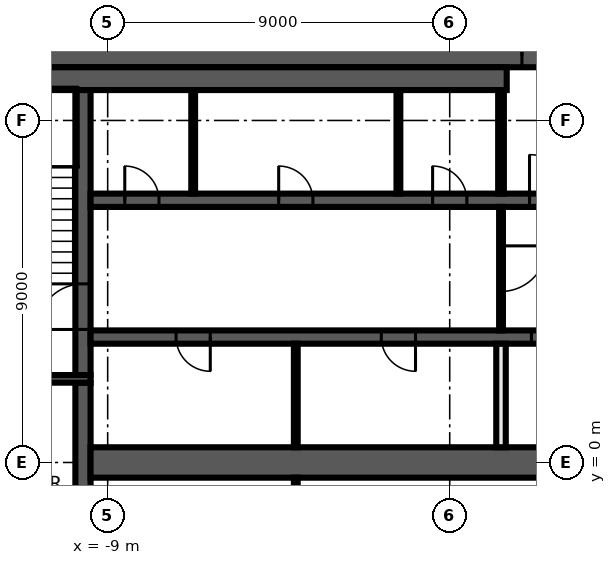
"""IFC4 building model, lengths in metres.
Left out: names, types, materials, properties, quantities, classifications, styles, units other than length and angle.
Written with IfcOpenShell. Run it as: python <this file> out.ifc"""

import sys

from ifc_helpers import new_model, si_unit, direction, frame, frame_2d, origin, place, context, subcontext, project, spatial, rectangle, extrude, element, fill, save


model = new_model("IFC4")
c1 = context("Model", 3, precision=1e-05, world=origin(), true_north=direction((0.0, 1.0)))
c2 = subcontext(c1, "Body", "Model", "MODEL_VIEW")
j1 = project(units=[si_unit("LENGTHUNIT", "METRE"), si_unit("PLANEANGLEUNIT", "RADIAN")], contexts=[c1])
p1 = place(None, origin())
s1 = spatial("IfcSite", under=j1, at=p1, CompositionType="ELEMENT")
p2 = place(p1, origin())
s2 = spatial("IfcBuilding", under=s1, at=p2, CompositionType="ELEMENT")
p3 = place(p2, frame((0.0, 0.0, 348.8)))
s3 = spatial("IfcBuildingStorey", under=s2, at=p3, CompositionType="ELEMENT", Elevation=348.8)
p4 = place(p3, frame((-14.0, 10.7, 0.0), z_axis=(0.0, 0.0, 1.0), x_axis=(1.0, 0.0, 0.0)))
e1 = element("IfcWall", 1, at=p4, inside=s3, PredefinedType="SHEAR", context=c2, shape_type="SweptSolid", body=[
    extrude(rectangle(XDim=28.0, YDim=0.6, at=frame_2d((14.0, 0.0))), origin(), (0.0, 0.0, 1.0), 3.7),
])
p5 = place(p4, frame((15.9, 0.0, 0.0)))
e2 = element("IfcOpeningElement", 2, at=p5, cuts=e1, PredefinedType="OPENING", context=c2, shape_type="SweptSolid", body=[
    extrude(rectangle(XDim=1.6, YDim=2.1, at=frame_2d((0.8, 1.05))), frame((0.0, 0.31, 0.0), z_axis=(0.0, -1.0, 0.0), x_axis=(1.0, 0.0, 0.0)), (0.0, 0.0, 1.0), 0.62),
])
p6 = place(p3, frame((-13.4, 10.1, 0.0), z_axis=(0.0, 0.0, 1.0), x_axis=(1.0, 0.0, 0.0)))
e3 = element("IfcWall", 3, at=p6, inside=s3, PredefinedType="SHEAR", context=c2, shape_type="SweptSolid", body=[
    extrude(rectangle(XDim=14.9, YDim=0.6, at=frame_2d((7.45, 0.0))), origin(), (0.0, 0.0, 1.0), 3.7),
])
p7 = place(p3, frame((-9.65, -2.1, 0.0), z_axis=(0.0, 0.0, 1.0), x_axis=(0.0, 1.0, 0.0)))
e4 = element("IfcWall", 4, at=p7, inside=s3, PredefinedType="SHEAR", context=c2, shape_type="SweptSolid", body=[
    extrude(rectangle(XDim=4.2, YDim=0.4, at=frame_2d((2.1, 0.0))), origin(), (0.0, 0.0, 1.0), 3.7),
])
p8 = place(p3, frame((-9.65, 2.3, 0.0), z_axis=(0.0, 0.0, 1.0), x_axis=(0.0, 1.0, 0.0)))
e5 = element("IfcWall", 5, at=p8, inside=s3, PredefinedType="SHEAR", context=c2, shape_type="SweptSolid", body=[
    extrude(rectangle(XDim=7.5, YDim=0.4, at=frame_2d((3.75, 0.0))), origin(), (0.0, 0.0, 1.0), 3.7),
])
p9 = place(p8, frame((1.2, 0.0, 0.0)))
e6 = element("IfcOpeningElement", 6, at=p9, cuts=e5, PredefinedType="OPENING", context=c2, shape_type="SweptSolid", body=[
    extrude(rectangle(XDim=1.2, YDim=2.1, at=frame_2d((0.6, 1.05))), frame((0.0, 0.21, 0.0), z_axis=(0.0, -1.0, 0.0), x_axis=(1.0, 0.0, 0.0)), (0.0, 0.0, 1.0), 0.42),
])
p10 = place(p3, frame((-9.45, 2.2, 0.0), z_axis=(0.0, 0.0, 1.0), x_axis=(-1.0, 0.0, 0.0)))
e7 = element("IfcWall", 7, at=p10, inside=s3, PredefinedType="SHEAR", context=c2, shape_type="SweptSolid", body=[
    extrude(rectangle(XDim=3.35, YDim=0.2, at=frame_2d((1.675, 0.0))), origin(), (0.0, 0.0, 1.0), 3.7),
])
p11 = place(p3, frame((-9.45, 6.9, 0.0), z_axis=(0.0, 0.0, 1.0), x_axis=(1.0, 0.0, 0.0)))
e8 = element("IfcWall", 8, at=p11, inside=s3, PredefinedType="SHEAR", context=c2, shape_type="SweptSolid", body=[
    extrude(rectangle(XDim=18.9, YDim=0.35, at=frame_2d((9.45, 0.0))), origin(), (0.0, 0.0, 1.0), 3.7),
])
p12 = place(p11, frame((11.55, 0.0, 0.0)))
e9 = element("IfcOpeningElement", 9, at=p12, cuts=e8, PredefinedType="OPENING", context=c2, shape_type="SweptSolid", body=[
    extrude(rectangle(XDim=1.2, YDim=2.1, at=frame_2d((0.6, 1.05))), frame((0.0, 0.185, 0.0), z_axis=(0.0, -1.0, 0.0), x_axis=(1.0, 0.0, 0.0)), (0.0, 0.0, 1.0), 0.37),
])
p13 = place(p11, frame((14.3, 0.0, 0.0)))
e10 = element("IfcOpeningElement", 10, at=p13, cuts=e8, PredefinedType="OPENING", context=c2, shape_type="SweptSolid", body=[
    extrude(rectangle(XDim=1.1, YDim=2.1, at=frame_2d((0.55, 1.05))), frame((0.0, 0.185, 0.0), z_axis=(0.0, -1.0, 0.0), x_axis=(1.0, 0.0, 0.0)), (0.0, 0.0, 1.0), 0.37),
])
p14 = place(p11, frame((17.0, 0.0, 0.0)))
e11 = element("IfcOpeningElement", 11, at=p14, cuts=e8, PredefinedType="OPENING", context=c2, shape_type="SweptSolid", body=[
    extrude(rectangle(XDim=1.1, YDim=2.1, at=frame_2d((0.55, 1.05))), frame((0.0, 0.185, 0.0), z_axis=(0.0, -1.0, 0.0), x_axis=(1.0, 0.0, 0.0)), (0.0, 0.0, 1.0), 0.37),
])
p15 = place(p11, frame((0.9, 0.0, 0.0)))
e12 = element("IfcOpeningElement", 12, at=p15, cuts=e8, PredefinedType="OPENING", context=c2, shape_type="SweptSolid", body=[
    extrude(rectangle(XDim=0.9, YDim=2.1, at=frame_2d((0.45, 1.05))), frame((0.0, 0.185, 0.0), z_axis=(0.0, -1.0, 0.0), x_axis=(1.0, 0.0, 0.0)), (0.0, 0.0, 1.0), 0.37),
])
p16 = place(p11, frame((4.95, 0.0, 0.0)))
e13 = element("IfcOpeningElement", 13, at=p16, cuts=e8, PredefinedType="OPENING", context=c2, shape_type="SweptSolid", body=[
    extrude(rectangle(XDim=0.9, YDim=2.1, at=frame_2d((0.45, 1.05))), frame((0.0, 0.185, 0.0), z_axis=(0.0, -1.0, 0.0), x_axis=(1.0, 0.0, 0.0)), (0.0, 0.0, 1.0), 0.37),
])
p17 = place(p11, frame((9.0, 0.0, 0.0)))
e14 = element("IfcOpeningElement", 14, at=p17, cuts=e8, PredefinedType="OPENING", context=c2, shape_type="SweptSolid", body=[
    extrude(rectangle(XDim=0.9, YDim=2.1, at=frame_2d((0.45, 1.05))), frame((0.0, 0.185, 0.0), z_axis=(0.0, -1.0, 0.0), x_axis=(1.0, 0.0, 0.0)), (0.0, 0.0, 1.0), 0.37),
])
p18 = place(p3, frame((9.45, 3.3, 0.0), z_axis=(0.0, 0.0, 1.0), x_axis=(-1.0, 0.0, 0.0)))
e15 = element("IfcWall", 15, at=p18, inside=s3, PredefinedType="SHEAR", context=c2, shape_type="SweptSolid", body=[
    extrude(rectangle(XDim=18.9, YDim=0.35, at=frame_2d((9.45, 0.0))), origin(), (0.0, 0.0, 1.0), 3.7),
])
p19 = place(p18, frame((6.2, 0.0, 0.0)))
e16 = element("IfcOpeningElement", 16, at=p19, cuts=e15, PredefinedType="OPENING", context=c2, shape_type="SweptSolid", body=[
    extrude(rectangle(XDim=1.1, YDim=2.1, at=frame_2d((0.55, 1.05))), frame((0.0, 0.185, 0.0), z_axis=(0.0, -1.0, 0.0), x_axis=(1.0, 0.0, 0.0)), (0.0, 0.0, 1.0), 0.37),
])
p20 = place(p18, frame((3.5, 0.0, 0.0)))
e17 = element("IfcOpeningElement", 17, at=p20, cuts=e15, PredefinedType="OPENING", context=c2, shape_type="SweptSolid", body=[
    extrude(rectangle(XDim=1.1, YDim=2.1, at=frame_2d((0.55, 1.05))), frame((0.0, 0.185, 0.0), z_axis=(0.0, -1.0, 0.0), x_axis=(1.0, 0.0, 0.0)), (0.0, 0.0, 1.0), 0.37),
])
p21 = place(p18, frame((0.9, 0.0, 0.0)))
e18 = element("IfcOpeningElement", 18, at=p21, cuts=e15, PredefinedType="OPENING", context=c2, shape_type="SweptSolid", body=[
    extrude(rectangle(XDim=0.9, YDim=2.1, at=frame_2d((0.45, 1.05))), frame((0.0, 0.185, 0.0), z_axis=(0.0, -1.0, 0.0), x_axis=(1.0, 0.0, 0.0)), (0.0, 0.0, 1.0), 0.37),
])
p22 = place(p18, frame((15.75, 0.0, 0.0)))
e19 = element("IfcOpeningElement", 19, at=p22, cuts=e15, PredefinedType="OPENING", context=c2, shape_type="SweptSolid", body=[
    extrude(rectangle(XDim=0.9, YDim=2.1, at=frame_2d((0.45, 1.05))), frame((0.0, 0.185, 0.0), z_axis=(0.0, -1.0, 0.0), x_axis=(1.0, 0.0, 0.0)), (0.0, 0.0, 1.0), 0.37),
])
p23 = place(p18, frame((10.35, 0.0, 0.0)))
e20 = element("IfcOpeningElement", 20, at=p23, cuts=e15, PredefinedType="OPENING", context=c2, shape_type="SweptSolid", body=[
    extrude(rectangle(XDim=0.9, YDim=2.1, at=frame_2d((0.45, 1.05))), frame((0.0, 0.185, 0.0), z_axis=(0.0, -1.0, 0.0), x_axis=(1.0, 0.0, 0.0)), (0.0, 0.0, 1.0), 0.37),
])
p24 = place(p3, frame((-9.45, 0.0, 0.0), z_axis=(0.0, 0.0, 1.0), x_axis=(1.0, 0.0, 0.0)))
e21 = element("IfcWall", 21, at=p24, inside=s3, PredefinedType="SHEAR", context=c2, shape_type="SweptSolid", body=[
    extrude(rectangle(XDim=18.9, YDim=0.8, at=frame_2d((9.45, 0.0))), origin(), (0.0, 0.0, 1.0), 3.7),
])
p25 = place(p3, frame((1.35, 7.075, 0.0), z_axis=(0.0, 0.0, 1.0), x_axis=(0.0, 1.0, 0.0)))
e22 = element("IfcWall", 22, at=p25, inside=s3, PredefinedType="PARTITIONING", context=c2, shape_type="SweptSolid", body=[
    extrude(rectangle(XDim=2.725, YDim=0.15, at=frame_2d((1.363, 0.0))), origin(), (0.0, 0.0, 1.0), 3.7),
])
p26 = place(p3, frame((1.35, 6.725, 0.0), z_axis=(0.0, 0.0, 1.0), x_axis=(0.0, -1.0, 0.0)))
e23 = element("IfcWall", 23, at=p26, inside=s3, PredefinedType="PARTITIONING", context=c2, shape_type="SweptSolid", body=[
    extrude(rectangle(XDim=3.25, YDim=0.1, at=frame_2d((1.625, 0.0))), origin(), (0.0, 0.0, 1.0), 3.7),
])
p27 = place(p26, frame((1.025, 0.0, 0.0)))
e24 = element("IfcOpeningElement", 24, at=p27, cuts=e23, PredefinedType="OPENING", context=c2, shape_type="SweptSolid", body=[
    extrude(rectangle(XDim=1.2, YDim=2.1, at=frame_2d((0.6, 1.05))), frame((0.0, 0.06, 0.0), z_axis=(0.0, -1.0, 0.0), x_axis=(1.0, 0.0, 0.0)), (0.0, 0.0, 1.0), 0.12),
])
p28 = place(p3, frame((1.35, 0.4, 0.0), z_axis=(0.0, 0.0, 1.0), x_axis=(0.0, 1.0, 0.0)))
e25 = element("IfcWall", 25, at=p28, inside=s3, PredefinedType="SOLIDWALL", context=c2, shape_type="SweptSolid", body=[
    extrude(rectangle(XDim=2.725, YDim=0.25, at=frame_2d((1.363, 0.0))), origin(), (0.0, 0.0, 1.0), 3.7),
])
for number, where, z_axis, x_axis in (
    (26, (-1.35, 7.075, 0.0), (0.0, 0.0, 1.0), (0.0, 1.0, 0.0)),
    (27, (-4.05, -3.125, 0.0), (0.0, 0.0, 1.0), (0.0, 1.0, 0.0)),
    (28, (-4.05, 0.4, 0.0), (0.0, 0.0, 1.0), (0.0, 1.0, 0.0)),
    (29, (-6.75, 7.075, 0.0), (0.0, 0.0, 1.0), (0.0, 1.0, 0.0)),
):
    element("IfcWall", number, at=place(p3, frame(where, z_axis=z_axis, x_axis=x_axis)), inside=s3, PredefinedType="PARTITIONING", context=c2, shape_type="SweptSolid", body=[
        extrude(rectangle(XDim=2.725, YDim=0.1, at=frame_2d((1.363, 0.0))), origin(), (0.0, 0.0, 1.0), 3.7),
    ])
p29 = place(p5, origin())
e30 = element("IfcDoor", 30, at=p29, inside=s3, OperationType="DOUBLE_DOOR_SINGLE_SWING", PredefinedType="DOOR", context=c2, shape_type="SweptSolid", body=[
    extrude(rectangle(XDim=1.6, YDim=2.1, at=frame_2d((0.8, 1.05))), frame((0.0, 0.025, 0.0), z_axis=(0.0, -1.0, 0.0), x_axis=(1.0, 0.0, 0.0)), (0.0, 0.0, 1.0), 0.05),
])
fill(e2, e30)
p30 = place(p12, origin())
e31 = element("IfcDoor", 31, at=p30, inside=s3, OperationType="SINGLE_SWING_LEFT", PredefinedType="DOOR", context=c2, shape_type="SweptSolid", body=[
    extrude(rectangle(XDim=1.2, YDim=2.1, at=frame_2d((0.6, 1.05))), frame((0.0, 0.025, 0.0), z_axis=(0.0, -1.0, 0.0), x_axis=(1.0, 0.0, 0.0)), (0.0, 0.0, 1.0), 0.05),
])
fill(e9, e31)
p31 = place(p19, origin())
e32 = element("IfcDoor", 32, at=p31, inside=s3, OperationType="DOUBLE_DOOR_SLIDING", PredefinedType="DOOR", context=c2, shape_type="SweptSolid", body=[
    extrude(rectangle(XDim=1.1, YDim=2.1, at=frame_2d((0.55, 1.05))), frame((0.0, 0.025, 0.0), z_axis=(0.0, -1.0, 0.0), x_axis=(1.0, 0.0, 0.0)), (0.0, 0.0, 1.0), 0.05),
])
fill(e16, e32)
p32 = place(p15, origin())
e33 = element("IfcDoor", 33, at=p32, inside=s3, OperationType="SINGLE_SWING_RIGHT", PredefinedType="DOOR", context=c2, shape_type="SweptSolid", body=[
    extrude(rectangle(XDim=0.9, YDim=2.1, at=frame_2d((0.45, 1.05))), frame((0.0, 0.025, 0.0), z_axis=(0.0, -1.0, 0.0), x_axis=(1.0, 0.0, 0.0)), (0.0, 0.0, 1.0), 0.05),
])
fill(e12, e33)
p33 = place(p16, origin())
e34 = element("IfcDoor", 34, at=p33, inside=s3, OperationType="SINGLE_SWING_LEFT", PredefinedType="DOOR", context=c2, shape_type="SweptSolid", body=[
    extrude(rectangle(XDim=0.9, YDim=2.1, at=frame_2d((0.45, 1.05))), frame((0.0, 0.025, 0.0), z_axis=(0.0, -1.0, 0.0), x_axis=(1.0, 0.0, 0.0)), (0.0, 0.0, 1.0), 0.05),
])
fill(e13, e34)
p34 = place(p17, origin())
e35 = element("IfcDoor", 35, at=p34, inside=s3, OperationType="SINGLE_SWING_RIGHT", PredefinedType="DOOR", context=c2, shape_type="SweptSolid", body=[
    extrude(rectangle(XDim=0.9, YDim=2.1, at=frame_2d((0.45, 1.05))), frame((0.0, 0.025, 0.0), z_axis=(0.0, -1.0, 0.0), x_axis=(1.0, 0.0, 0.0)), (0.0, 0.0, 1.0), 0.05),
])
fill(e14, e35)
p35 = place(p22, origin())
e36 = element("IfcDoor", 36, at=p35, inside=s3, OperationType="SINGLE_SWING_LEFT", PredefinedType="DOOR", context=c2, shape_type="SweptSolid", body=[
    extrude(rectangle(XDim=0.9, YDim=2.1, at=frame_2d((0.45, 1.05))), frame((0.0, 0.025, 0.0), z_axis=(0.0, -1.0, 0.0), x_axis=(1.0, 0.0, 0.0)), (0.0, 0.0, 1.0), 0.05),
])
fill(e19, e36)
p36 = place(p23, origin())
e37 = element("IfcDoor", 37, at=p36, inside=s3, OperationType="SINGLE_SWING_RIGHT", PredefinedType="DOOR", context=c2, shape_type="SweptSolid", body=[
    extrude(rectangle(XDim=0.9, YDim=2.1, at=frame_2d((0.45, 1.05))), frame((0.0, 0.025, 0.0), z_axis=(0.0, -1.0, 0.0), x_axis=(1.0, 0.0, 0.0)), (0.0, 0.0, 1.0), 0.05),
])
fill(e20, e37)
p37 = place(p9, origin())
e38 = element("IfcDoor", 38, at=p37, inside=s3, OperationType="SINGLE_SWING_RIGHT", PredefinedType="DOOR", context=c2, shape_type="SweptSolid", body=[
    extrude(rectangle(XDim=1.2, YDim=2.1, at=frame_2d((0.6, 1.05))), frame((0.0, 0.025, 0.0), z_axis=(0.0, -1.0, 0.0), x_axis=(1.0, 0.0, 0.0)), (0.0, 0.0, 1.0), 0.05),
])
fill(e6, e38)
p38 = place(p27, origin())
e39 = element("IfcDoor", 39, at=p38, inside=s3, OperationType="SINGLE_SWING_LEFT", PredefinedType="DOOR", context=c2, shape_type="SweptSolid", body=[
    extrude(rectangle(XDim=1.2, YDim=2.1, at=frame_2d((0.6, 1.05))), frame((0.0, 0.025, 0.0), z_axis=(0.0, -1.0, 0.0), x_axis=(1.0, 0.0, 0.0)), (0.0, 0.0, 1.0), 0.05),
])
fill(e24, e39)
save(model, sys.argv[1])
